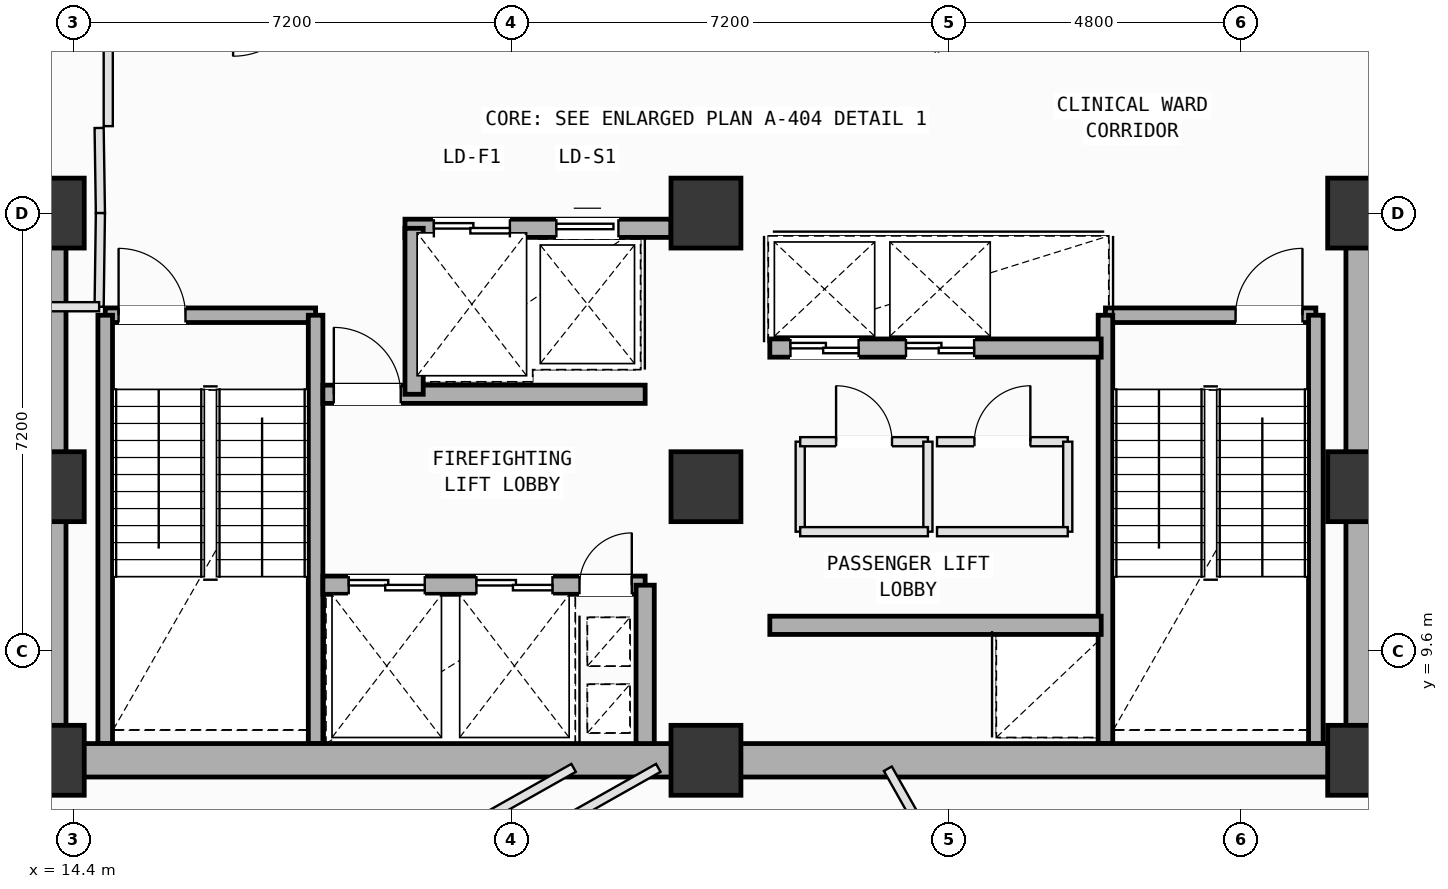
"""IFC4 building model, lengths in metres.
Left out: names, types, materials, properties, quantities, classifications, styles, units other than length and angle.
Written with IfcOpenShell. Run it as: python <this file> out.ifc"""

import sys

from ifc_helpers import new_model, si_unit, direction, frame, frame_2d, origin, origin_2d, place, context, subcontext, project, spatial, rectangle, extrude, element, fill, save


model = new_model("IFC4")
c1 = context("Model", 3, precision=1e-05, world=origin(), true_north=direction((0.0, 1.0)))
c2 = subcontext(c1, "Body", "Model", "MODEL_VIEW")
j1 = project(units=[si_unit("LENGTHUNIT", "METRE"), si_unit("PLANEANGLEUNIT", "RADIAN")], contexts=[c1])
p1 = place(None, origin())
s1 = spatial("IfcSite", under=j1, at=p1, CompositionType="ELEMENT")
p2 = place(p1, origin())
s2 = spatial("IfcBuilding", under=s1, at=p2, CompositionType="ELEMENT")
p3 = place(p2, frame((0.0, 0.0, 149.8)))
s3 = spatial("IfcBuildingStorey", under=s2, at=p3, CompositionType="ELEMENT", Elevation=149.8)
for number, where, z_axis, x_axis in (
    (1, (14.0, 7.8, 0.0), (0.0, 0.0, 1.0), (1.0, 0.0, 0.0)),
    (2, (14.0, 12.3, 0.0), (0.0, 0.0, 1.0), (1.0, 0.0, 0.0)),
    (3, (14.0, 16.8, 0.0), (0.0, 0.0, 1.0), (1.0, 0.0, 0.0)),
    (4, (24.8, 7.8, 0.0), (0.0, 0.0, 1.0), (1.0, 0.0, 0.0)),
    (5, (24.8, 12.3, 0.0), (0.0, 0.0, 1.0), (1.0, 0.0, 0.0)),
    (6, (24.8, 16.8, 0.0), (0.0, 0.0, 1.0), (1.0, 0.0, 0.0)),
    (7, (35.6, 7.8, 0.0), (0.0, 0.0, 1.0), (1.0, 0.0, 0.0)),
    (8, (35.6, 12.3, 0.0), (0.0, 0.0, 1.0), (1.0, 0.0, 0.0)),
    (9, (35.6, 16.8, 0.0), (0.0, 0.0, 1.0), (1.0, 0.0, 0.0)),
):
    element("IfcColumn", number, at=place(p3, frame(where, z_axis=z_axis, x_axis=x_axis)), inside=s3, PredefinedType="COLUMN", context=c2, shape_type="SweptSolid", body=[
        extrude(rectangle(XDim=1.15, YDim=1.15, at=origin_2d()), origin(), (0.0, 0.0, 1.0), 4.0),
    ])
p4 = place(p3, frame((14.92, 15.12, 0.0), z_axis=(0.0, 0.0, 1.0), x_axis=(1.0, 0.0, 0.0)))
e10 = element("IfcWall", 10, at=p4, inside=s3, PredefinedType="SOLIDWALL", context=c2, shape_type="SweptSolid", body=[
    extrude(rectangle(XDim=3.46, YDim=0.24, at=frame_2d((1.73, 0.0))), origin(), (0.0, 0.0, 1.0), 3.78),
])
p5 = place(p4, frame((0.22, 0.0, 0.0)))
e11 = element("IfcOpeningElement", 11, at=p5, cuts=e10, PredefinedType="OPENING", context=c2, shape_type="SweptSolid", body=[
    extrude(rectangle(XDim=1.1, YDim=2.15, at=frame_2d((0.55, 1.075))), frame((0.0, 0.13, 0.0), z_axis=(0.0, -1.0, 0.0), x_axis=(1.0, 0.0, 0.0)), (0.0, 0.0, 1.0), 0.26),
])
for number, where, z_axis, x_axis in (
    (12, (18.38, 15.12, 0.0), (0.0, 0.0, 1.0), (0.0, -1.0, 0.0)),
    (13, (14.92, 8.075, 0.0), (0.0, 0.0, 1.0), (0.0, 1.0, 0.0)),
):
    element("IfcWall", number, at=place(p3, frame(where, z_axis=z_axis, x_axis=x_axis)), inside=s3, PredefinedType="SOLIDWALL", context=c2, shape_type="SweptSolid", body=[
        extrude(rectangle(XDim=7.045, YDim=0.24, at=frame_2d((3.522, 0.0))), origin(), (0.0, 0.0, 1.0), 3.78),
    ])
p6 = place(p3, frame((31.37, 15.12, 0.0), z_axis=(0.0, 0.0, 1.0), x_axis=(1.0, 0.0, 0.0)))
e14 = element("IfcWall", 14, at=p6, inside=s3, PredefinedType="SOLIDWALL", context=c2, shape_type="SweptSolid", body=[
    extrude(rectangle(XDim=3.46, YDim=0.24, at=frame_2d((1.73, 0.0))), origin(), (0.0, 0.0, 1.0), 3.78),
])
p7 = place(p6, frame((2.14, 0.0, 0.0)))
e15 = element("IfcOpeningElement", 15, at=p7, cuts=e14, PredefinedType="OPENING", context=c2, shape_type="SweptSolid", body=[
    extrude(rectangle(XDim=1.1, YDim=2.15, at=frame_2d((0.55, 1.075))), frame((0.0, 0.13, 0.0), z_axis=(0.0, -1.0, 0.0), x_axis=(1.0, 0.0, 0.0)), (0.0, 0.0, 1.0), 0.26),
])
for number, where, z_axis, x_axis in (
    (16, (34.83, 15.12, 0.0), (0.0, 0.0, 1.0), (0.0, -1.0, 0.0)),
    (17, (31.37, 8.075, 0.0), (0.0, 0.0, 1.0), (0.0, 1.0, 0.0)),
):
    element("IfcWall", number, at=place(p3, frame(where, z_axis=z_axis, x_axis=x_axis)), inside=s3, PredefinedType="SOLIDWALL", context=c2, shape_type="SweptSolid", body=[
        extrude(rectangle(XDim=7.045, YDim=0.24, at=frame_2d((3.522, 0.0))), origin(), (0.0, 0.0, 1.0), 3.78),
    ])
for number, where, z_axis, x_axis in (
    (18, (14.0, 7.8, 0.0), (0.0, 0.0, 1.0), (1.0, 0.0, 0.0)),
    (19, (24.8, 7.8, 0.0), (0.0, 0.0, 1.0), (1.0, 0.0, 0.0)),
):
    element("IfcWall", number, at=place(p3, frame(where, z_axis=z_axis, x_axis=x_axis)), inside=s3, PredefinedType="SHEAR", context=c2, shape_type="SweptSolid", body=[
        extrude(rectangle(XDim=10.8, YDim=0.55, at=frame_2d((5.4, 0.0))), origin(), (0.0, 0.0, 1.0), 3.78),
    ])
for number, where, z_axis, x_axis in (
    (20, (35.6, 7.8, 0.0), (0.0, 0.0, 1.0), (0.0, 1.0, 0.0)),
    (21, (14.0, 16.8, 0.0), (0.0, 0.0, 1.0), (0.0, -1.0, 0.0)),
):
    element("IfcWall", number, at=place(p3, frame(where, z_axis=z_axis, x_axis=x_axis)), inside=s3, PredefinedType="SHEAR", context=c2, shape_type="SweptSolid", body=[
        extrude(rectangle(XDim=9.0, YDim=0.55, at=frame_2d((4.5, 0.0))), origin(), (0.0, 0.0, 1.0), 3.78),
    ])
p8 = place(p3, frame((19.85, 16.55, 0.0), z_axis=(0.0, 0.0, 1.0), x_axis=(1.0, 0.0, 0.0)))
e22 = element("IfcWall", 22, at=p8, inside=s3, PredefinedType="SOLIDWALL", context=c2, shape_type="SweptSolid", body=[
    extrude(rectangle(XDim=4.375, YDim=0.3, at=frame_2d((2.188, 0.0))), origin(), (0.0, 0.0, 1.0), 3.78),
])
p9 = place(p8, frame((0.475, 0.0, 0.0)))
e23 = element("IfcOpeningElement", 23, at=p9, cuts=e22, PredefinedType="OPENING", context=c2, shape_type="SweptSolid", body=[
    extrude(rectangle(XDim=1.25, YDim=2.18, at=frame_2d((0.625, 1.09))), frame((0.0, 0.16, 0.0), z_axis=(0.0, -1.0, 0.0), x_axis=(1.0, 0.0, 0.0)), (0.0, 0.0, 1.0), 0.32),
])
p10 = place(p8, frame((2.49, 0.0, 0.0)))
e24 = element("IfcOpeningElement", 24, at=p10, cuts=e22, PredefinedType="OPENING", context=c2, shape_type="SweptSolid", body=[
    extrude(rectangle(XDim=1.02, YDim=2.12, at=frame_2d((0.51, 1.06))), frame((0.0, 0.16, 0.0), z_axis=(0.0, -1.0, 0.0), x_axis=(1.0, 0.0, 0.0)), (0.0, 0.0, 1.0), 0.32),
])
p11 = place(p3, frame((18.5, 10.68, 0.0), z_axis=(0.0, 0.0, 1.0), x_axis=(1.0, 0.0, 0.0)))
e25 = element("IfcWall", 25, at=p11, inside=s3, PredefinedType="SOLIDWALL", context=c2, shape_type="SweptSolid", body=[
    extrude(rectangle(XDim=5.3, YDim=0.3, at=frame_2d((2.65, 0.0))), origin(), (0.0, 0.0, 1.0), 3.78),
])
p12 = place(p11, frame((4.22, 0.0, 0.0)))
e26 = element("IfcOpeningElement", 26, at=p12, cuts=e25, PredefinedType="OPENING", context=c2, shape_type="SweptSolid", body=[
    extrude(rectangle(XDim=0.86, YDim=2.06, at=frame_2d((0.43, 1.03))), frame((0.0, 0.16, 0.0), z_axis=(0.0, -1.0, 0.0), x_axis=(1.0, 0.0, 0.0)), (0.0, 0.0, 1.0), 0.32),
])
p13 = place(p11, frame((0.425, 0.0, 0.0)))
e27 = element("IfcOpeningElement", 27, at=p13, cuts=e25, PredefinedType="OPENING", context=c2, shape_type="SweptSolid", body=[
    extrude(rectangle(XDim=1.25, YDim=2.18, at=frame_2d((0.625, 1.09))), frame((0.0, 0.16, 0.0), z_axis=(0.0, -1.0, 0.0), x_axis=(1.0, 0.0, 0.0)), (0.0, 0.0, 1.0), 0.32),
])
p14 = place(p11, frame((2.525, 0.0, 0.0)))
e28 = element("IfcOpeningElement", 28, at=p14, cuts=e25, PredefinedType="OPENING", context=c2, shape_type="SweptSolid", body=[
    extrude(rectangle(XDim=1.25, YDim=2.18, at=frame_2d((0.625, 1.09))), frame((0.0, 0.16, 0.0), z_axis=(0.0, -1.0, 0.0), x_axis=(1.0, 0.0, 0.0)), (0.0, 0.0, 1.0), 0.32),
])
p15 = place(p3, frame((18.5, 13.82, 0.0), z_axis=(0.0, 0.0, 1.0), x_axis=(1.0, 0.0, 0.0)))
e29 = element("IfcWall", 29, at=p15, inside=s3, PredefinedType="SOLIDWALL", context=c2, shape_type="SweptSolid", body=[
    extrude(rectangle(XDim=5.3, YDim=0.3, at=frame_2d((2.65, 0.0))), origin(), (0.0, 0.0, 1.0), 3.78),
])
p16 = place(p15, frame((0.18, 0.0, 0.0)))
e30 = element("IfcOpeningElement", 30, at=p16, cuts=e29, PredefinedType="OPENING", context=c2, shape_type="SweptSolid", body=[
    extrude(rectangle(XDim=1.1, YDim=2.15, at=frame_2d((0.55, 1.075))), frame((0.0, 0.16, 0.0), z_axis=(0.0, -1.0, 0.0), x_axis=(1.0, 0.0, 0.0)), (0.0, 0.0, 1.0), 0.32),
])
p17 = place(p3, frame((23.8, 8.075, 0.0), z_axis=(0.0, 0.0, 1.0), x_axis=(0.0, 1.0, 0.0)))
e31 = element("IfcWall", 31, at=p17, inside=s3, PredefinedType="SOLIDWALL", context=c2, shape_type="SweptSolid", body=[
    extrude(rectangle(XDim=2.605, YDim=0.3, at=frame_2d((1.302, 0.0))), origin(), (0.0, 0.0, 1.0), 3.78),
])
p18 = place(p3, frame((20.0, 13.82, 0.0), z_axis=(0.0, 0.0, 1.0), x_axis=(0.0, 1.0, 0.0)))
e32 = element("IfcWall", 32, at=p18, inside=s3, PredefinedType="SOLIDWALL", context=c2, shape_type="SweptSolid", body=[
    extrude(rectangle(XDim=2.73, YDim=0.3, at=frame_2d((1.365, 0.0))), origin(), (0.0, 0.0, 1.0), 3.78),
])
p19 = place(p3, frame((25.85, 10.02, 0.0), z_axis=(0.0, 0.0, 1.0), x_axis=(1.0, 0.0, 0.0)))
e33 = element("IfcWall", 33, at=p19, inside=s3, PredefinedType="SOLIDWALL", context=c2, shape_type="SweptSolid", body=[
    extrude(rectangle(XDim=5.45, YDim=0.3, at=frame_2d((2.725, 0.0))), origin(), (0.0, 0.0, 1.0), 3.78),
])
p20 = place(p3, frame((25.85, 14.58, 0.0), z_axis=(0.0, 0.0, 1.0), x_axis=(1.0, 0.0, 0.0)))
e34 = element("IfcWall", 34, at=p20, inside=s3, PredefinedType="SOLIDWALL", context=c2, shape_type="SweptSolid", body=[
    extrude(rectangle(XDim=5.45, YDim=0.3, at=frame_2d((2.725, 0.0))), origin(), (0.0, 0.0, 1.0), 3.78),
])
p21 = place(p20, frame((0.34, 0.0, 0.0)))
e35 = element("IfcOpeningElement", 35, at=p21, cuts=e34, PredefinedType="OPENING", context=c2, shape_type="SweptSolid", body=[
    extrude(rectangle(XDim=1.12, YDim=2.15, at=frame_2d((0.56, 1.075))), frame((0.0, 0.16, 0.0), z_axis=(0.0, -1.0, 0.0), x_axis=(1.0, 0.0, 0.0)), (0.0, 0.0, 1.0), 0.32),
])
p22 = place(p20, frame((2.24, 0.0, 0.0)))
e36 = element("IfcOpeningElement", 36, at=p22, cuts=e34, PredefinedType="OPENING", context=c2, shape_type="SweptSolid", body=[
    extrude(rectangle(XDim=1.12, YDim=2.15, at=frame_2d((0.56, 1.075))), frame((0.0, 0.16, 0.0), z_axis=(0.0, -1.0, 0.0), x_axis=(1.0, 0.0, 0.0)), (0.0, 0.0, 1.0), 0.32),
])
p23 = place(p3, frame((26.35, 11.56, 0.0), z_axis=(0.0, 0.0, 1.0), x_axis=(0.0, 1.0, 0.0)))
e37 = element("IfcWall", 37, at=p23, inside=s3, PredefinedType="PARTITIONING", context=c2, shape_type="SweptSolid", body=[
    extrude(rectangle(XDim=1.48, YDim=0.15, at=frame_2d((0.74, 0.0))), origin(), (0.0, 0.0, 1.0), 3.78),
])
p24 = place(p3, frame((26.35, 13.04, 0.0), z_axis=(0.0, 0.0, 1.0), x_axis=(1.0, 0.0, 0.0)))
e38 = element("IfcWall", 38, at=p24, inside=s3, PredefinedType="PARTITIONING", context=c2, shape_type="SweptSolid", body=[
    extrude(rectangle(XDim=2.1, YDim=0.15, at=frame_2d((1.05, 0.0))), origin(), (0.0, 0.0, 1.0), 3.78),
])
p25 = place(p24, frame((0.59, 0.0, 0.0)))
e39 = element("IfcOpeningElement", 39, at=p25, cuts=e38, PredefinedType="OPENING", context=c2, shape_type="SweptSolid", body=[
    extrude(rectangle(XDim=0.92, YDim=2.1, at=frame_2d((0.46, 1.05))), frame((0.0, 0.085, 0.0), z_axis=(0.0, -1.0, 0.0), x_axis=(1.0, 0.0, 0.0)), (0.0, 0.0, 1.0), 0.17),
])
p26 = place(p3, frame((28.45, 13.04, 0.0), z_axis=(0.0, 0.0, 1.0), x_axis=(0.0, -1.0, 0.0)))
e40 = element("IfcWall", 40, at=p26, inside=s3, PredefinedType="PARTITIONING", context=c2, shape_type="SweptSolid", body=[
    extrude(rectangle(XDim=1.48, YDim=0.15, at=frame_2d((0.74, 0.0))), origin(), (0.0, 0.0, 1.0), 3.78),
])
p27 = place(p3, frame((28.45, 11.56, 0.0), z_axis=(0.0, 0.0, 1.0), x_axis=(-1.0, 0.0, 0.0)))
e41 = element("IfcWall", 41, at=p27, inside=s3, PredefinedType="PARTITIONING", context=c2, shape_type="SweptSolid", body=[
    extrude(rectangle(XDim=2.1, YDim=0.15, at=frame_2d((1.05, 0.0))), origin(), (0.0, 0.0, 1.0), 3.78),
])
p28 = place(p3, frame((28.6, 13.04, 0.0), z_axis=(0.0, 0.0, 1.0), x_axis=(1.0, 0.0, 0.0)))
e42 = element("IfcWall", 42, at=p28, inside=s3, PredefinedType="PARTITIONING", context=c2, shape_type="SweptSolid", body=[
    extrude(rectangle(XDim=2.15, YDim=0.15, at=frame_2d((1.075, 0.0))), origin(), (0.0, 0.0, 1.0), 3.78),
])
p29 = place(p28, frame((0.615, 0.0, 0.0)))
e43 = element("IfcOpeningElement", 43, at=p29, cuts=e42, PredefinedType="OPENING", context=c2, shape_type="SweptSolid", body=[
    extrude(rectangle(XDim=0.92, YDim=2.1, at=frame_2d((0.46, 1.05))), frame((0.0, 0.085, 0.0), z_axis=(0.0, -1.0, 0.0), x_axis=(1.0, 0.0, 0.0)), (0.0, 0.0, 1.0), 0.17),
])
p30 = place(p3, frame((30.75, 13.04, 0.0), z_axis=(0.0, 0.0, 1.0), x_axis=(0.0, -1.0, 0.0)))
e44 = element("IfcWall", 44, at=p30, inside=s3, PredefinedType="PARTITIONING", context=c2, shape_type="SweptSolid", body=[
    extrude(rectangle(XDim=1.48, YDim=0.15, at=frame_2d((0.74, 0.0))), origin(), (0.0, 0.0, 1.0), 3.78),
])
p31 = place(p3, frame((30.75, 11.56, 0.0), z_axis=(0.0, 0.0, 1.0), x_axis=(-1.0, 0.0, 0.0)))
e45 = element("IfcWall", 45, at=p31, inside=s3, PredefinedType="PARTITIONING", context=c2, shape_type="SweptSolid", body=[
    extrude(rectangle(XDim=2.15, YDim=0.15, at=frame_2d((1.075, 0.0))), origin(), (0.0, 0.0, 1.0), 3.78),
])
p32 = place(p3, frame((22.135, 6.613, 0.0), z_axis=(0.0, 0.0, 1.0), x_axis=(0.870804799459, 0.491628926366, 0.0)))
e46 = element("IfcWall", 46, at=p32, inside=s3, PredefinedType="PARTITIONING", context=c2, shape_type="SweptSolid", body=[
    extrude(rectangle(XDim=2.16, YDim=0.15, at=frame_2d((1.08, 0.0))), origin(), (0.0, 0.0, 1.0), 3.78),
])
p33 = place(p3, frame((27.791, 7.661, 0.0), z_axis=(0.0, 0.0, 1.0), x_axis=(0.491670086217, -0.870781560622, 0.0)))
e47 = element("IfcWall", 47, at=p33, inside=s3, PredefinedType="PARTITIONING", context=c2, shape_type="SweptSolid", body=[
    extrude(rectangle(XDim=10.411, YDim=0.15, at=frame_2d((5.206, 0.0))), origin(), (0.0, 0.0, 1.0), 3.78),
])
p34 = place(p33, frame((4.948, 0.0, 0.0)))
e48 = element("IfcOpeningElement", 48, at=p34, cuts=e47, PredefinedType="OPENING", context=c2, shape_type="SweptSolid", body=[
    extrude(rectangle(XDim=0.86, YDim=2.06, at=frame_2d((0.43, 1.03))), frame((0.0, 0.085, 0.0), z_axis=(0.0, -1.0, 0.0), x_axis=(1.0, 0.0, 0.0)), (0.0, 0.0, 1.0), 0.17),
])
p35 = place(p3, frame((35.6, 7.5, 0.0), z_axis=(0.0, 0.0, 1.0), x_axis=(1.0, 0.0, 0.0)))
e49 = element("IfcWall", 49, at=p35, inside=s3, PredefinedType="PARTITIONING", context=c2, shape_type="SweptSolid", body=[
    extrude(rectangle(XDim=0.55, YDim=0.15, at=frame_2d((0.275, 0.0))), origin(), (0.0, 0.0, 1.0), 2.765),
])
p36 = place(p3, frame((22.623, 7.675, 0.0), z_axis=(0.0, 0.0, 1.0), x_axis=(-0.870803770124, -0.491630749586, 0.0)))
e50 = element("IfcWall", 50, at=p36, inside=s3, PredefinedType="PARTITIONING", context=c2, shape_type="SweptSolid", body=[
    extrude(rectangle(XDim=9.357, YDim=0.15, at=frame_2d((4.678, 0.0))), origin(), (0.0, 0.0, 1.0), 3.78),
])
p37 = place(p3, frame((14.97, 20.55, 0.0), z_axis=(0.0, 0.0, 1.0), x_axis=(0.0, -1.0, 0.0)))
e51 = element("IfcWall", 51, at=p37, inside=s3, PredefinedType="PARTITIONING", context=c2, shape_type="SweptSolid", body=[
    extrude(rectangle(XDim=2.32, YDim=0.15, at=frame_2d((1.16, 0.0))), origin(), (0.0, 0.0, 1.0), 2.765),
])
p38 = place(p3, frame((14.82, 18.2, 0.0), z_axis=(0.0, 0.0, 1.0), x_axis=(0.01499656939, -0.99988754513, 0.0)))
e52 = element("IfcWall", 52, at=p38, inside=s3, PredefinedType="PARTITIONING", context=c2, shape_type="SweptSolid", body=[
    extrude(rectangle(XDim=1.4, YDim=0.15, at=frame_2d((0.7, 0.0))), origin(), (0.0, 0.0, 1.0), 3.78),
])
p39 = place(p3, frame((14.841, 16.8, 0.0), z_axis=(0.0, 0.0, 1.0), x_axis=(-0.01363221443, -0.999907077048, 0.0)))
e53 = element("IfcWall", 53, at=p39, inside=s3, PredefinedType="PARTITIONING", context=c2, shape_type="SweptSolid", body=[
    extrude(rectangle(XDim=1.54, YDim=0.15, at=frame_2d((0.77, 0.0))), origin(), (0.0, 0.0, 1.0), 3.78),
])
p40 = place(p3, frame((14.82, 15.26, 0.0), z_axis=(0.0, 0.0, 1.0), x_axis=(-1.0, 0.0, 0.0)))
e54 = element("IfcWall", 54, at=p40, inside=s3, PredefinedType="PARTITIONING", context=c2, shape_type="SweptSolid", body=[
    extrude(rectangle(XDim=1.12, YDim=0.15, at=frame_2d((0.56, 0.0))), origin(), (0.0, 0.0, 1.0), 3.78),
])
p41 = place(p3, frame((6.884, 16.519, 0.0), z_axis=(0.0, 0.0, 1.0), x_axis=(0.870744187076, 0.491736271464, 0.0)))
e55 = element("IfcWall", 55, at=p41, inside=s3, PredefinedType="PARTITIONING", context=c2, shape_type="SweptSolid", body=[
    extrude(rectangle(XDim=13.635, YDim=0.15, at=frame_2d((6.818, 0.0))), origin(), (0.0, 0.0, 1.0), 3.78),
])
p42 = place(p5, origin())
e56 = element("IfcDoor", 56, at=p42, inside=s3, OperationType="SINGLE_SWING_LEFT", PredefinedType="DOOR", context=c2, shape_type="SweptSolid", body=[
    extrude(rectangle(XDim=1.1, YDim=2.15, at=frame_2d((0.55, 1.075))), frame((0.0, 0.025, 0.0), z_axis=(0.0, -1.0, 0.0), x_axis=(1.0, 0.0, 0.0)), (0.0, 0.0, 1.0), 0.05),
])
fill(e11, e56)
p43 = place(p7, origin())
e57 = element("IfcDoor", 57, at=p43, inside=s3, OperationType="SINGLE_SWING_RIGHT", PredefinedType="DOOR", context=c2, shape_type="SweptSolid", body=[
    extrude(rectangle(XDim=1.1, YDim=2.15, at=frame_2d((0.55, 1.075))), frame((0.0, 0.025, 0.0), z_axis=(0.0, -1.0, 0.0), x_axis=(1.0, 0.0, 0.0)), (0.0, 0.0, 1.0), 0.05),
])
fill(e15, e57)
p44 = place(p12, origin())
e58 = element("IfcDoor", 58, at=p44, inside=s3, OperationType="SINGLE_SWING_RIGHT", PredefinedType="DOOR", context=c2, shape_type="SweptSolid", body=[
    extrude(rectangle(XDim=0.86, YDim=2.06, at=frame_2d((0.43, 1.03))), frame((0.0, 0.025, 0.0), z_axis=(0.0, -1.0, 0.0), x_axis=(1.0, 0.0, 0.0)), (0.0, 0.0, 1.0), 0.05),
])
fill(e26, e58)
p45 = place(p16, origin())
e59 = element("IfcDoor", 59, at=p45, inside=s3, OperationType="SINGLE_SWING_LEFT", PredefinedType="DOOR", context=c2, shape_type="SweptSolid", body=[
    extrude(rectangle(XDim=1.1, YDim=2.15, at=frame_2d((0.55, 1.075))), frame((0.0, 0.025, 0.0), z_axis=(0.0, -1.0, 0.0), x_axis=(1.0, 0.0, 0.0)), (0.0, 0.0, 1.0), 0.05),
])
fill(e30, e59)
p46 = place(p13, origin())
e60 = element("IfcDoor", 60, at=p46, inside=s3, OperationType="DOUBLE_DOOR_SLIDING", PredefinedType="DOOR", context=c2, shape_type="SweptSolid", body=[
    extrude(rectangle(XDim=1.25, YDim=2.18, at=frame_2d((0.625, 1.09))), frame((0.0, 0.025, 0.0), z_axis=(0.0, -1.0, 0.0), x_axis=(1.0, 0.0, 0.0)), (0.0, 0.0, 1.0), 0.05),
])
fill(e27, e60)
p47 = place(p14, origin())
e61 = element("IfcDoor", 61, at=p47, inside=s3, OperationType="DOUBLE_DOOR_SLIDING", PredefinedType="DOOR", context=c2, shape_type="SweptSolid", body=[
    extrude(rectangle(XDim=1.25, YDim=2.18, at=frame_2d((0.625, 1.09))), frame((0.0, 0.025, 0.0), z_axis=(0.0, -1.0, 0.0), x_axis=(1.0, 0.0, 0.0)), (0.0, 0.0, 1.0), 0.05),
])
fill(e28, e61)
p48 = place(p21, origin())
e62 = element("IfcDoor", 62, at=p48, inside=s3, OperationType="DOUBLE_DOOR_SLIDING", PredefinedType="DOOR", context=c2, shape_type="SweptSolid", body=[
    extrude(rectangle(XDim=1.12, YDim=2.15, at=frame_2d((0.56, 1.075))), frame((0.0, 0.025, 0.0), z_axis=(0.0, -1.0, 0.0), x_axis=(1.0, 0.0, 0.0)), (0.0, 0.0, 1.0), 0.05),
])
fill(e35, e62)
p49 = place(p22, origin())
e63 = element("IfcDoor", 63, at=p49, inside=s3, OperationType="DOUBLE_DOOR_SLIDING", PredefinedType="DOOR", context=c2, shape_type="SweptSolid", body=[
    extrude(rectangle(XDim=1.12, YDim=2.15, at=frame_2d((0.56, 1.075))), frame((0.0, 0.025, 0.0), z_axis=(0.0, -1.0, 0.0), x_axis=(1.0, 0.0, 0.0)), (0.0, 0.0, 1.0), 0.05),
])
fill(e36, e63)
p50 = place(p9, origin())
e64 = element("IfcDoor", 64, at=p50, inside=s3, OperationType="DOUBLE_DOOR_SLIDING", PredefinedType="DOOR", context=c2, shape_type="SweptSolid", body=[
    extrude(rectangle(XDim=1.25, YDim=2.18, at=frame_2d((0.625, 1.09))), frame((0.0, 0.025, 0.0), z_axis=(0.0, -1.0, 0.0), x_axis=(1.0, 0.0, 0.0)), (0.0, 0.0, 1.0), 0.05),
])
fill(e23, e64)
p51 = place(p10, origin())
e65 = element("IfcDoor", 65, at=p51, inside=s3, OperationType="SLIDING_TO_LEFT", PredefinedType="DOOR", context=c2, shape_type="SweptSolid", body=[
    extrude(rectangle(XDim=1.02, YDim=2.12, at=frame_2d((0.51, 1.06))), frame((0.0, 0.025, 0.0), z_axis=(0.0, -1.0, 0.0), x_axis=(1.0, 0.0, 0.0)), (0.0, 0.0, 1.0), 0.05),
])
fill(e24, e65)
p52 = place(p25, origin())
e66 = element("IfcDoor", 66, at=p52, inside=s3, OperationType="SINGLE_SWING_LEFT", PredefinedType="DOOR", context=c2, shape_type="SweptSolid", body=[
    extrude(rectangle(XDim=0.92, YDim=2.1, at=frame_2d((0.46, 1.05))), frame((0.0, 0.025, 0.0), z_axis=(0.0, -1.0, 0.0), x_axis=(1.0, 0.0, 0.0)), (0.0, 0.0, 1.0), 0.05),
])
fill(e39, e66)
p53 = place(p29, origin())
e67 = element("IfcDoor", 67, at=p53, inside=s3, OperationType="SINGLE_SWING_RIGHT", PredefinedType="DOOR", context=c2, shape_type="SweptSolid", body=[
    extrude(rectangle(XDim=0.92, YDim=2.1, at=frame_2d((0.46, 1.05))), frame((0.0, 0.025, 0.0), z_axis=(0.0, -1.0, 0.0), x_axis=(1.0, 0.0, 0.0)), (0.0, 0.0, 1.0), 0.05),
])
fill(e43, e67)
save(model, sys.argv[1])
